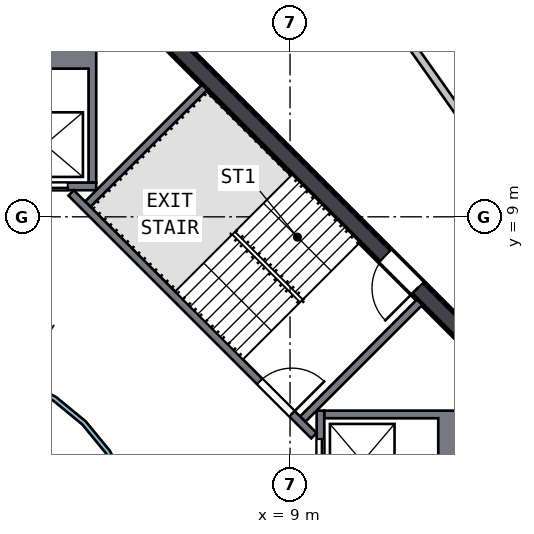
"""IFC4 building model, lengths in metres.
Left out: names, types, materials, properties, quantities, classifications, styles, units other than length and angle.
Written with IfcOpenShell. Run it as: python <this file> out.ifc"""

import sys

from ifc_helpers import new_model, si_unit, direction, frame, frame_2d, origin, place, context, subcontext, project, spatial, polyline, rectangle, outline, extrude, element, fill, save


model = new_model("IFC4")
c1 = context("Model", 3, precision=1e-05, world=origin(), true_north=direction((0.0, 1.0)))
c2 = subcontext(c1, "Body", "Model", "MODEL_VIEW")
j1 = project(units=[si_unit("LENGTHUNIT", "METRE"), si_unit("PLANEANGLEUNIT", "RADIAN")], contexts=[c1])
p1 = place(None, origin())
s1 = spatial("IfcSite", under=j1, at=p1, CompositionType="ELEMENT")
p2 = place(p1, origin())
s2 = spatial("IfcBuilding", under=s1, at=p2, CompositionType="ELEMENT")
p3 = place(p2, frame((0.0, 0.0, 299.5)))
s3 = spatial("IfcBuildingStorey", under=s2, at=p3, CompositionType="ELEMENT", Elevation=299.5)
p4 = place(p3, frame((13.841, 5.64, 0.0), z_axis=(0.0, 0.0, 1.0), x_axis=(-0.707106781, 0.707106781, 0.0)))
e1 = element("IfcWall", 1, at=p4, inside=s3, PredefinedType="SHEAR", context=c2, shape_type="SweptSolid", body=[
    extrude(rectangle(XDim=11.598, YDim=0.45, at=frame_2d((5.799, 0.0))), origin(), (0.0, 0.0, 1.0), 3.5),
])
p5 = place(p4, frame((2.099, 0.0, 0.0)))
e2 = element("IfcOpeningElement", 2, at=p5, cuts=e1, PredefinedType="OPENING", context=c2, shape_type="SweptSolid", body=[
    extrude(rectangle(XDim=1.2, YDim=2.1, at=frame_2d((0.6, 1.05))), frame((0.0, 0.235, 0.0), z_axis=(0.0, -1.0, 0.0), x_axis=(1.0, 0.0, 0.0)), (0.0, 0.0, 1.0), 0.47),
])
p6 = place(p3, origin())
e3 = element("IfcWall", 3, at=p6, inside=s3, PredefinedType="SOLIDWALL", context=c2, shape_type="SweptSolid", body=[
    extrude(outline(polyline([(13.55, 3.9), (13.55, 1.2), (9.9, 1.2), (9.9, 1.4), (12.9, 1.4), (12.9, 3.7), (9.9, 3.7), (9.9, 3.9), (13.55, 3.9)])), origin(), (0.0, 0.0, 1.0), 3.19),
])
p7 = place(p3, frame((9.8, 1.2, 0.0), z_axis=(0.0, 0.0, 1.0), x_axis=(0.0, 1.0, 0.0)))
e4 = element("IfcWall", 4, at=p7, inside=s3, PredefinedType="SOLIDWALL", context=c2, shape_type="SweptSolid", body=[
    extrude(rectangle(XDim=2.7, YDim=0.2, at=frame_2d((1.35, 0.0))), origin(), (0.0, 0.0, 1.0), 3.19),
])
p8 = place(p7, frame((0.75, 0.0, 0.0)))
e5 = element("IfcOpeningElement", 5, at=p8, cuts=e4, PredefinedType="OPENING", context=c2, shape_type="SweptSolid", body=[
    extrude(rectangle(XDim=1.2, YDim=2.1, at=frame_2d((0.6, 1.05))), frame((0.0, 0.11, 0.0), z_axis=(0.0, -1.0, 0.0), x_axis=(1.0, 0.0, 0.0)), (0.0, 0.0, 1.0), 0.22),
])
p9 = place(p3, origin())
e6 = element("IfcWall", 6, at=p9, inside=s3, PredefinedType="SOLIDWALL", context=c2, shape_type="SweptSolid", body=[
    extrude(outline(polyline([(3.9, 9.9), (3.7, 9.9), (3.7, 12.9), (1.4, 12.9), (1.4, 9.9), (1.2, 9.9), (1.2, 13.55), (3.9, 13.55), (3.9, 9.9)])), origin(), (0.0, 0.0, 1.0), 3.19),
])
p10 = place(p3, frame((1.2, 9.8, 0.0), z_axis=(0.0, 0.0, 1.0), x_axis=(1.0, 0.0, 0.0)))
e7 = element("IfcWall", 7, at=p10, inside=s3, PredefinedType="SOLIDWALL", context=c2, shape_type="SweptSolid", body=[
    extrude(rectangle(XDim=2.7, YDim=0.2, at=frame_2d((1.35, 0.0))), origin(), (0.0, 0.0, 1.0), 3.19),
])
p11 = place(p10, frame((0.75, 0.0, 0.0)))
e8 = element("IfcOpeningElement", 8, at=p11, cuts=e7, PredefinedType="OPENING", context=c2, shape_type="SweptSolid", body=[
    extrude(rectangle(XDim=1.2, YDim=2.1, at=frame_2d((0.6, 1.05))), frame((0.0, 0.11, 0.0), z_axis=(0.0, -1.0, 0.0), x_axis=(1.0, 0.0, 0.0)), (0.0, 0.0, 1.0), 0.22),
])
p12 = place(p3, frame((3.24, 9.629, 0.0), z_axis=(0.0, 0.0, 1.0), x_axis=(0.707106781, -0.707106781, 0.0)))
e9 = element("IfcWall", 9, at=p12, inside=s3, PredefinedType="SOLIDWALL", context=c2, shape_type="SweptSolid", body=[
    extrude(rectangle(XDim=9.036, YDim=0.2, at=frame_2d((4.518, 0.0))), origin(), (0.0, 0.0, 1.0), 3.19),
])
p13 = place(p12, frame((7.018, 0.0, 0.0)))
e10 = element("IfcOpeningElement", 10, at=p13, cuts=e9, PredefinedType="OPENING", context=c2, shape_type="SweptSolid", body=[
    extrude(rectangle(XDim=1.2, YDim=2.1, at=frame_2d((0.6, 1.05))), frame((0.0, 0.11, 0.0), z_axis=(0.0, -1.0, 0.0), x_axis=(1.0, 0.0, 0.0)), (0.0, 0.0, 1.0), 0.22),
])
for number, where, z_axis, x_axis in (
    (11, (9.334, 3.677, 0.0), (0.0, 0.0, 1.0), (0.707, 0.707, 0.0)),
    (12, (3.677, 9.334, 0.0), (0.0, 0.0, 1.0), (0.707, 0.707, 0.0)),
):
    element("IfcWall", number, at=place(p3, frame(where, z_axis=z_axis, x_axis=x_axis)), inside=s3, PredefinedType="SOLIDWALL", context=c2, shape_type="SweptSolid", body=[
        extrude(rectangle(XDim=4.35, YDim=0.2, at=frame_2d((2.175, 0.0))), origin(), (0.0, 0.0, 1.0), 3.19),
    ])
p14 = place(p3, origin())
e13 = element("IfcWall", 13, at=p14, inside=s3, PredefinedType="SOLIDWALL", context=c2, shape_type="SweptSolid", body=[
    extrude(outline(polyline([(5.021, -0.999), (4.73, -1.959), (4.257, -2.844), (3.62, -3.62), (2.844, -4.257), (1.959, -4.73), (0.999, -5.021), (0.0, -5.12), (-0.999, -5.021), (-1.959, -4.73), (-2.844, -4.257), (-3.62, -3.62), (-4.257, -2.844), (-4.73, -1.959), (-5.021, -0.999), (-5.12, 0.0), (-5.021, 0.999), (-4.73, 1.959), (-4.257, 2.844), (-3.62, 3.62), (-2.844, 4.257), (-1.959, 4.73), (-0.999, 5.021), (0.0, 5.12), (0.999, 5.021), (1.959, 4.73), (2.844, 4.257), (3.62, 3.62), (4.257, 2.844), (4.73, 1.959), (5.021, 0.999), (5.12, 0.0), (5.021, -0.999)]), holes=[polyline([(4.904, 0.976), (4.619, 1.913), (4.157, 2.778), (3.535, 3.535), (2.778, 4.157), (1.913, 4.619), (0.976, 4.904), (0.0, 5.0), (-0.976, 4.904), (-1.913, 4.619), (-2.778, 4.157), (-3.535, 3.535), (-4.157, 2.778), (-4.619, 1.913), (-4.904, 0.976), (-5.0, 0.0), (-4.904, -0.976), (-4.619, -1.913), (-4.157, -2.778), (-3.535, -3.535), (-2.778, -4.157), (-1.913, -4.619), (-0.976, -4.904), (0.0, -5.0), (0.976, -4.904), (1.913, -4.619), (2.778, -4.157), (3.535, -3.535), (4.157, -2.778), (4.619, -1.913), (4.904, -0.976), (5.0, 0.0), (4.904, 0.976)])]), origin(), (0.0, 0.0, 1.0), 3.19),
])
p15 = place(p3, frame((13.746, 11.318, 0.0), z_axis=(0.0, 0.0, 1.0), x_axis=(-0.577572602, 0.816339322, 0.0)))
e14 = element("IfcWall", 14, at=p15, inside=s3, PredefinedType="SOLIDWALL", context=c2, shape_type="SweptSolid", body=[
    extrude(rectangle(XDim=3.458, YDim=0.2, at=frame_2d((1.729, 0.0))), origin(), (0.0, 0.0, 1.0), 3.19),
])
p16 = place(p8, origin())
e15 = element("IfcDoor", 15, at=p16, inside=s3, OperationType="DOUBLE_DOOR_SLIDING", PredefinedType="DOOR", context=c2, shape_type="SweptSolid", body=[
    extrude(rectangle(XDim=1.2, YDim=2.1, at=frame_2d((0.6, 1.05))), frame((0.0, 0.025, 0.0), z_axis=(0.0, -1.0, 0.0), x_axis=(1.0, 0.0, 0.0)), (0.0, 0.0, 1.0), 0.05),
])
fill(e5, e15)
p17 = place(p11, origin())
e16 = element("IfcDoor", 16, at=p17, inside=s3, OperationType="DOUBLE_DOOR_SLIDING", PredefinedType="DOOR", context=c2, shape_type="SweptSolid", body=[
    extrude(rectangle(XDim=1.2, YDim=2.1, at=frame_2d((0.6, 1.05))), frame((0.0, 0.025, 0.0), z_axis=(0.0, -1.0, 0.0), x_axis=(1.0, 0.0, 0.0)), (0.0, 0.0, 1.0), 0.05),
])
fill(e8, e16)
p18 = place(p13, origin())
e17 = element("IfcDoor", 17, at=p18, inside=s3, OperationType="SINGLE_SWING_RIGHT", PredefinedType="DOOR", context=c2, shape_type="SweptSolid", body=[
    extrude(rectangle(XDim=1.2, YDim=2.1, at=frame_2d((0.6, 1.05))), frame((0.0, 0.025, 0.0), z_axis=(0.0, -1.0, 0.0), x_axis=(1.0, 0.0, 0.0)), (0.0, 0.0, 1.0), 0.05),
])
fill(e10, e17)
p19 = place(p5, origin())
e18 = element("IfcDoor", 18, at=p19, inside=s3, OperationType="SINGLE_SWING_LEFT", PredefinedType="DOOR", context=c2, shape_type="SweptSolid", body=[
    extrude(rectangle(XDim=1.2, YDim=2.1, at=frame_2d((0.6, 1.05))), frame((0.0, 0.025, 0.0), z_axis=(0.0, -1.0, 0.0), x_axis=(1.0, 0.0, 0.0)), (0.0, 0.0, 1.0), 0.05),
])
fill(e2, e18)
save(model, sys.argv[1])
